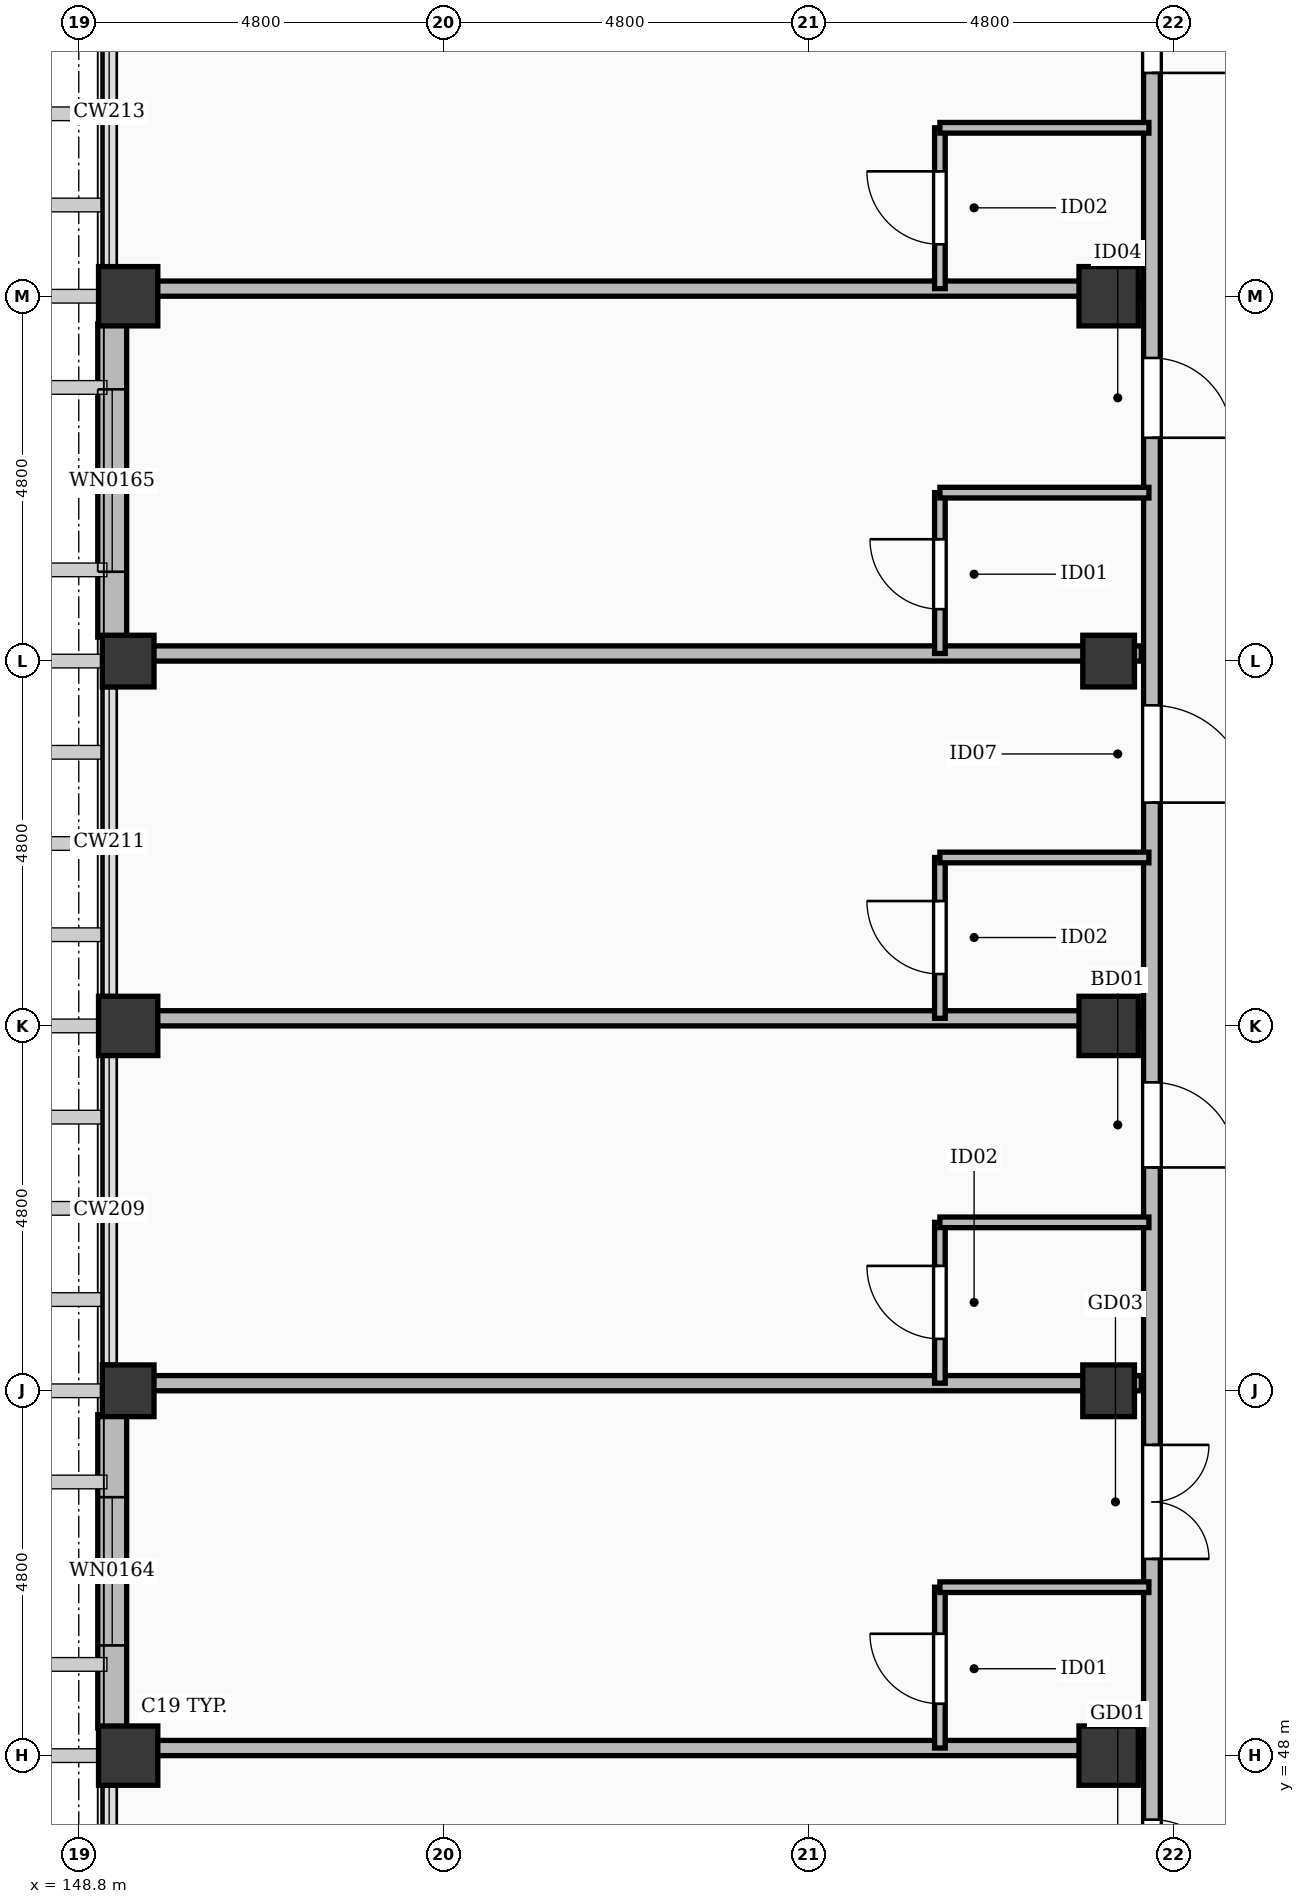
"""IFC4 building model, lengths in metres.
Left out: names, types, materials, properties, quantities, classifications, styles, units other than length and angle.
Written with IfcOpenShell. Run it as: python <this file> out.ifc"""

import sys

from ifc_helpers import new_model, si_unit, direction, frame, frame_2d, origin, origin_2d, place, context, subcontext, project, spatial, rectangle, extrude, element, fill, save


model = new_model("IFC4")
c1 = context("Model", 3, precision=1e-05, world=origin(), true_north=direction((0.0, 1.0)))
c2 = subcontext(c1, "Body", "Model", "MODEL_VIEW")
j1 = project(units=[si_unit("LENGTHUNIT", "METRE"), si_unit("PLANEANGLEUNIT", "RADIAN")], contexts=[c1])
p1 = place(None, origin())
s1 = spatial("IfcSite", under=j1, at=p1, CompositionType="ELEMENT")
p2 = place(p1, origin())
s2 = spatial("IfcBuilding", under=s1, at=p2, CompositionType="ELEMENT")
p3 = place(p2, frame((0.0, 0.0, 24.6)))
s3 = spatial("IfcBuildingStorey", under=s2, at=p3, CompositionType="ELEMENT", Elevation=24.6)
for number, where, z_axis, x_axis in (
    (1, (149.45, 48.0, 0.0), (0.0, 0.0, 1.0), (1.0, 0.0, 0.0)),
    (2, (149.45, 57.6, 0.0), (0.0, 0.0, 1.0), (1.0, 0.0, 0.0)),
    (3, (149.45, 67.2, 0.0), (0.0, 0.0, 1.0), (1.0, 0.0, 0.0)),
    (4, (162.35, 48.0, 0.0), (0.0, 0.0, 1.0), (1.0, 0.0, 0.0)),
    (5, (162.35, 57.6, 0.0), (0.0, 0.0, 1.0), (1.0, 0.0, 0.0)),
    (6, (162.35, 67.2, 0.0), (0.0, 0.0, 1.0), (1.0, 0.0, 0.0)),
):
    element("IfcColumn", number, at=place(p3, frame(where, z_axis=z_axis, x_axis=x_axis)), inside=s3, PredefinedType="COLUMN", context=c2, shape_type="SweptSolid", body=[
        extrude(rectangle(XDim=0.78, YDim=0.78, at=origin_2d()), origin(), (0.0, 0.0, 1.0), 3.6),
    ])
for number, where, z_axis, x_axis in (
    (7, (149.45, 52.8, 0.0), (0.0, 0.0, 1.0), (1.0, 0.0, 0.0)),
    (8, (149.45, 62.4, 0.0), (0.0, 0.0, 1.0), (1.0, 0.0, 0.0)),
    (9, (162.35, 52.8, 0.0), (0.0, 0.0, 1.0), (1.0, 0.0, 0.0)),
    (10, (162.35, 62.4, 0.0), (0.0, 0.0, 1.0), (1.0, 0.0, 0.0)),
):
    element("IfcColumn", number, at=place(p3, frame(where, z_axis=z_axis, x_axis=x_axis)), inside=s3, PredefinedType="COLUMN", context=c2, shape_type="SweptSolid", body=[
        extrude(rectangle(XDim=0.68, YDim=0.68, at=origin_2d()), origin(), (0.0, 0.0, 1.0), 3.6),
    ])
p4 = place(p3, frame((149.24, 48.365, 0.0), z_axis=(0.0, 0.0, 1.0), x_axis=(0.0, 1.0, 0.0)))
e11 = element("IfcWall", 11, at=p4, inside=s3, PredefinedType="SOLIDWALL", context=c2, shape_type="SweptSolid", body=[
    extrude(rectangle(XDim=4.12, YDim=0.38, at=frame_2d((2.06, 0.0))), origin(), (0.0, 0.0, 1.0), 2.632),
])
p5 = place(p4, frame((1.085, 0.0, 0.55)))
e12 = element("IfcOpeningElement", 12, at=p5, cuts=e11, PredefinedType="OPENING", context=c2, shape_type="SweptSolid", body=[
    extrude(rectangle(XDim=1.95, YDim=1.77, at=frame_2d((0.975, 0.885))), frame((0.0, 0.202, 0.0), z_axis=(0.0, -1.0, 0.0), x_axis=(1.0, 0.0, 0.0)), (0.0, 0.0, 1.0), 0.404),
])
p6 = place(p3, frame((149.24, 62.715, 0.0), z_axis=(0.0, 0.0, 1.0), x_axis=(0.0, 1.0, 0.0)))
e13 = element("IfcWall", 13, at=p6, inside=s3, PredefinedType="SOLIDWALL", context=c2, shape_type="SweptSolid", body=[
    extrude(rectangle(XDim=4.12, YDim=0.38, at=frame_2d((2.06, 0.0))), origin(), (0.0, 0.0, 1.0), 2.632),
])
p7 = place(p6, frame((0.86, 0.0, 0.55)))
e14 = element("IfcOpeningElement", 14, at=p7, cuts=e13, PredefinedType="OPENING", context=c2, shape_type="SweptSolid", body=[
    extrude(rectangle(XDim=2.4, YDim=1.8, at=frame_2d((1.2, 0.9))), frame((0.0, 0.202, 0.0), z_axis=(0.0, -1.0, 0.0), x_axis=(1.0, 0.0, 0.0)), (0.0, 0.0, 1.0), 0.404),
])
p8 = place(p3, frame((162.92, 29.15, 0.0), z_axis=(0.0, 0.0, 1.0), x_axis=(0.0, 1.0, 0.0)))
e15 = element("IfcWall", 15, at=p8, inside=s3, PredefinedType="PARTITIONING", context=c2, shape_type="SweptSolid", body=[
    extrude(rectangle(XDim=44.05, YDim=0.22, at=frame_2d((22.025, 0.0))), origin(), (0.0, 0.0, 1.0), 2.632),
])
p9 = place(p8, frame((5.15, 0.0, 0.0)))
e16 = element("IfcOpeningElement", 16, at=p9, cuts=e15, PredefinedType="OPENING", context=c2, shape_type="SweptSolid", body=[
    extrude(rectangle(XDim=0.98, YDim=2.15, at=frame_2d((0.49, 1.075))), frame((0.0, 0.122, 0.0), z_axis=(0.0, -1.0, 0.0), x_axis=(1.0, 0.0, 0.0)), (0.0, 0.0, 1.0), 0.244),
])
p10 = place(p8, frame((12.188, 0.0, 0.0)))
e17 = element("IfcOpeningElement", 17, at=p10, cuts=e15, PredefinedType="OPENING", context=c2, shape_type="SweptSolid", body=[
    extrude(rectangle(XDim=1.08, YDim=2.25, at=frame_2d((0.54, 1.125))), frame((0.0, 0.122, 0.0), z_axis=(0.0, -1.0, 0.0), x_axis=(1.0, 0.0, 0.0)), (0.0, 0.0, 1.0), 0.244),
])
p11 = place(p8, frame((16.988, 0.0, 0.0)))
e18 = element("IfcOpeningElement", 18, at=p11, cuts=e15, PredefinedType="OPENING", context=c2, shape_type="SweptSolid", body=[
    extrude(rectangle(XDim=1.02, YDim=2.2, at=frame_2d((0.51, 1.1))), frame((0.0, 0.122, 0.0), z_axis=(0.0, -1.0, 0.0), x_axis=(1.0, 0.0, 0.0)), (0.0, 0.0, 1.0), 0.244),
])
p12 = place(p8, frame((21.438, 0.0, 0.0)))
e19 = element("IfcOpeningElement", 19, at=p12, cuts=e15, PredefinedType="OPENING", context=c2, shape_type="SweptSolid", body=[
    extrude(rectangle(XDim=1.5, YDim=2.3, at=frame_2d((0.75, 1.15))), frame((0.0, 0.122, 0.0), z_axis=(0.0, -1.0, 0.0), x_axis=(1.0, 0.0, 0.0)), (0.0, 0.0, 1.0), 0.244),
])
p13 = place(p8, frame((26.588, 0.0, 0.0)))
e20 = element("IfcOpeningElement", 20, at=p13, cuts=e15, PredefinedType="OPENING", context=c2, shape_type="SweptSolid", body=[
    extrude(rectangle(XDim=1.12, YDim=2.15, at=frame_2d((0.56, 1.075))), frame((0.0, 0.122, 0.0), z_axis=(0.0, -1.0, 0.0), x_axis=(1.0, 0.0, 0.0)), (0.0, 0.0, 1.0), 0.244),
])
p14 = place(p8, frame((31.388, 0.0, 0.0)))
e21 = element("IfcOpeningElement", 21, at=p14, cuts=e15, PredefinedType="OPENING", context=c2, shape_type="SweptSolid", body=[
    extrude(rectangle(XDim=1.28, YDim=2.16, at=frame_2d((0.64, 1.08))), frame((0.0, 0.122, 0.0), z_axis=(0.0, -1.0, 0.0), x_axis=(1.0, 0.0, 0.0)), (0.0, 0.0, 1.0), 0.244),
])
p15 = place(p8, frame((36.188, 0.0, 0.0)))
e22 = element("IfcOpeningElement", 22, at=p15, cuts=e15, PredefinedType="OPENING", context=c2, shape_type="SweptSolid", body=[
    extrude(rectangle(XDim=1.05, YDim=2.18, at=frame_2d((0.525, 1.09))), frame((0.0, 0.122, 0.0), z_axis=(0.0, -1.0, 0.0), x_axis=(1.0, 0.0, 0.0)), (0.0, 0.0, 1.0), 0.244),
])
p16 = place(p8, frame((40.988, 0.0, 0.0)))
e23 = element("IfcOpeningElement", 23, at=p16, cuts=e15, PredefinedType="OPENING", context=c2, shape_type="SweptSolid", body=[
    extrude(rectangle(XDim=1.08, YDim=2.25, at=frame_2d((0.54, 1.125))), frame((0.0, 0.122, 0.0), z_axis=(0.0, -1.0, 0.0), x_axis=(1.0, 0.0, 0.0)), (0.0, 0.0, 1.0), 0.244),
])
p17 = place(p3, frame((149.55, 48.1, 0.0), z_axis=(0.0, 0.0, 1.0), x_axis=(1.0, 0.0, 0.0)))
e24 = element("IfcWall", 24, at=p17, inside=s3, PredefinedType="PARTITIONING", context=c2, shape_type="SweptSolid", body=[
    extrude(rectangle(XDim=13.23, YDim=0.2, at=frame_2d((6.615, 0.0))), origin(), (0.0, 0.0, 1.0), 2.632),
])
p18 = place(p3, frame((160.13, 48.1, 0.0), z_axis=(0.0, 0.0, 1.0), x_axis=(0.0, 1.0, 0.0)))
e25 = element("IfcWall", 25, at=p18, inside=s3, PredefinedType="PARTITIONING", context=c2, shape_type="SweptSolid", body=[
    extrude(rectangle(XDim=2.116, YDim=0.14, at=frame_2d((1.058, 0.0))), origin(), (0.0, 0.0, 1.0), 2.632),
])
p19 = place(p18, frame((0.583, 0.0, 0.0)))
e26 = element("IfcOpeningElement", 26, at=p19, cuts=e25, PredefinedType="OPENING", context=c2, shape_type="SweptSolid", body=[
    extrude(rectangle(XDim=0.92, YDim=2.1, at=frame_2d((0.46, 1.05))), frame((0.0, 0.082, 0.0), z_axis=(0.0, -1.0, 0.0), x_axis=(1.0, 0.0, 0.0)), (0.0, 0.0, 1.0), 0.164),
])
p20 = place(p3, frame((160.13, 50.216, 0.0), z_axis=(0.0, 0.0, 1.0), x_axis=(1.0, 0.0, 0.0)))
e27 = element("IfcWall", 27, at=p20, inside=s3, PredefinedType="PARTITIONING", context=c2, shape_type="SweptSolid", body=[
    extrude(rectangle(XDim=2.75, YDim=0.14, at=frame_2d((1.375, 0.0))), origin(), (0.0, 0.0, 1.0), 2.632),
])
p21 = place(p3, frame((149.55, 52.9, 0.0), z_axis=(0.0, 0.0, 1.0), x_axis=(1.0, 0.0, 0.0)))
e28 = element("IfcWall", 28, at=p21, inside=s3, PredefinedType="PARTITIONING", context=c2, shape_type="SweptSolid", body=[
    extrude(rectangle(XDim=13.23, YDim=0.2, at=frame_2d((6.615, 0.0))), origin(), (0.0, 0.0, 1.0), 2.632),
])
p22 = place(p3, frame((160.13, 52.9, 0.0), z_axis=(0.0, 0.0, 1.0), x_axis=(0.0, 1.0, 0.0)))
e29 = element("IfcWall", 29, at=p22, inside=s3, PredefinedType="PARTITIONING", context=c2, shape_type="SweptSolid", body=[
    extrude(rectangle(XDim=2.116, YDim=0.14, at=frame_2d((1.058, 0.0))), origin(), (0.0, 0.0, 1.0), 2.632),
])
p23 = place(p22, frame((0.583, 0.0, 0.0)))
e30 = element("IfcOpeningElement", 30, at=p23, cuts=e29, PredefinedType="OPENING", context=c2, shape_type="SweptSolid", body=[
    extrude(rectangle(XDim=0.96, YDim=2.12, at=frame_2d((0.48, 1.06))), frame((0.0, 0.082, 0.0), z_axis=(0.0, -1.0, 0.0), x_axis=(1.0, 0.0, 0.0)), (0.0, 0.0, 1.0), 0.164),
])
p24 = place(p3, frame((160.13, 55.016, 0.0), z_axis=(0.0, 0.0, 1.0), x_axis=(1.0, 0.0, 0.0)))
e31 = element("IfcWall", 31, at=p24, inside=s3, PredefinedType="PARTITIONING", context=c2, shape_type="SweptSolid", body=[
    extrude(rectangle(XDim=2.75, YDim=0.14, at=frame_2d((1.375, 0.0))), origin(), (0.0, 0.0, 1.0), 2.632),
])
p25 = place(p3, frame((149.55, 57.7, 0.0), z_axis=(0.0, 0.0, 1.0), x_axis=(1.0, 0.0, 0.0)))
e32 = element("IfcWall", 32, at=p25, inside=s3, PredefinedType="PARTITIONING", context=c2, shape_type="SweptSolid", body=[
    extrude(rectangle(XDim=13.23, YDim=0.2, at=frame_2d((6.615, 0.0))), origin(), (0.0, 0.0, 1.0), 2.632),
])
p26 = place(p3, frame((160.13, 57.7, 0.0), z_axis=(0.0, 0.0, 1.0), x_axis=(0.0, 1.0, 0.0)))
e33 = element("IfcWall", 33, at=p26, inside=s3, PredefinedType="PARTITIONING", context=c2, shape_type="SweptSolid", body=[
    extrude(rectangle(XDim=2.116, YDim=0.14, at=frame_2d((1.058, 0.0))), origin(), (0.0, 0.0, 1.0), 2.632),
])
p27 = place(p26, frame((0.583, 0.0, 0.0)))
e34 = element("IfcOpeningElement", 34, at=p27, cuts=e33, PredefinedType="OPENING", context=c2, shape_type="SweptSolid", body=[
    extrude(rectangle(XDim=0.96, YDim=2.12, at=frame_2d((0.48, 1.06))), frame((0.0, 0.082, 0.0), z_axis=(0.0, -1.0, 0.0), x_axis=(1.0, 0.0, 0.0)), (0.0, 0.0, 1.0), 0.164),
])
p28 = place(p3, frame((160.13, 59.816, 0.0), z_axis=(0.0, 0.0, 1.0), x_axis=(1.0, 0.0, 0.0)))
e35 = element("IfcWall", 35, at=p28, inside=s3, PredefinedType="PARTITIONING", context=c2, shape_type="SweptSolid", body=[
    extrude(rectangle(XDim=2.75, YDim=0.14, at=frame_2d((1.375, 0.0))), origin(), (0.0, 0.0, 1.0), 2.632),
])
p29 = place(p3, frame((149.55, 62.5, 0.0), z_axis=(0.0, 0.0, 1.0), x_axis=(1.0, 0.0, 0.0)))
e36 = element("IfcWall", 36, at=p29, inside=s3, PredefinedType="PARTITIONING", context=c2, shape_type="SweptSolid", body=[
    extrude(rectangle(XDim=13.23, YDim=0.2, at=frame_2d((6.615, 0.0))), origin(), (0.0, 0.0, 1.0), 2.632),
])
p30 = place(p3, frame((160.13, 62.5, 0.0), z_axis=(0.0, 0.0, 1.0), x_axis=(0.0, 1.0, 0.0)))
e37 = element("IfcWall", 37, at=p30, inside=s3, PredefinedType="PARTITIONING", context=c2, shape_type="SweptSolid", body=[
    extrude(rectangle(XDim=2.116, YDim=0.14, at=frame_2d((1.058, 0.0))), origin(), (0.0, 0.0, 1.0), 2.632),
])
p31 = place(p30, frame((0.583, 0.0, 0.0)))
e38 = element("IfcOpeningElement", 38, at=p31, cuts=e37, PredefinedType="OPENING", context=c2, shape_type="SweptSolid", body=[
    extrude(rectangle(XDim=0.92, YDim=2.1, at=frame_2d((0.46, 1.05))), frame((0.0, 0.082, 0.0), z_axis=(0.0, -1.0, 0.0), x_axis=(1.0, 0.0, 0.0)), (0.0, 0.0, 1.0), 0.164),
])
p32 = place(p3, frame((160.13, 64.616, 0.0), z_axis=(0.0, 0.0, 1.0), x_axis=(1.0, 0.0, 0.0)))
e39 = element("IfcWall", 39, at=p32, inside=s3, PredefinedType="PARTITIONING", context=c2, shape_type="SweptSolid", body=[
    extrude(rectangle(XDim=2.75, YDim=0.14, at=frame_2d((1.375, 0.0))), origin(), (0.0, 0.0, 1.0), 2.632),
])
p33 = place(p3, frame((149.55, 67.3, 0.0), z_axis=(0.0, 0.0, 1.0), x_axis=(1.0, 0.0, 0.0)))
e40 = element("IfcWall", 40, at=p33, inside=s3, PredefinedType="PARTITIONING", context=c2, shape_type="SweptSolid", body=[
    extrude(rectangle(XDim=13.23, YDim=0.2, at=frame_2d((6.615, 0.0))), origin(), (0.0, 0.0, 1.0), 2.632),
])
p34 = place(p3, frame((160.13, 67.3, 0.0), z_axis=(0.0, 0.0, 1.0), x_axis=(0.0, 1.0, 0.0)))
e41 = element("IfcWall", 41, at=p34, inside=s3, PredefinedType="PARTITIONING", context=c2, shape_type="SweptSolid", body=[
    extrude(rectangle(XDim=2.116, YDim=0.14, at=frame_2d((1.058, 0.0))), origin(), (0.0, 0.0, 1.0), 2.632),
])
p35 = place(p34, frame((0.583, 0.0, 0.0)))
e42 = element("IfcOpeningElement", 42, at=p35, cuts=e41, PredefinedType="OPENING", context=c2, shape_type="SweptSolid", body=[
    extrude(rectangle(XDim=0.96, YDim=2.12, at=frame_2d((0.48, 1.06))), frame((0.0, 0.082, 0.0), z_axis=(0.0, -1.0, 0.0), x_axis=(1.0, 0.0, 0.0)), (0.0, 0.0, 1.0), 0.164),
])
p36 = place(p3, frame((160.13, 69.416, 0.0), z_axis=(0.0, 0.0, 1.0), x_axis=(1.0, 0.0, 0.0)))
e43 = element("IfcWall", 43, at=p36, inside=s3, PredefinedType="PARTITIONING", context=c2, shape_type="SweptSolid", body=[
    extrude(rectangle(XDim=2.75, YDim=0.14, at=frame_2d((1.375, 0.0))), origin(), (0.0, 0.0, 1.0), 2.632),
])
p37 = place(p5, origin())
e44 = element("IfcWindow", 44, at=p37, inside=s3, PartitioningType="SINGLE_PANEL", PredefinedType="WINDOW", context=c2, shape_type="SweptSolid", body=[
    extrude(rectangle(XDim=1.95, YDim=1.77, at=frame_2d((0.975, 0.885))), frame((0.0, 0.03, 0.0), z_axis=(0.0, -1.0, 0.0), x_axis=(1.0, 0.0, 0.0)), (0.0, 0.0, 1.0), 0.06),
])
fill(e12, e44)
p38 = place(p7, origin())
e45 = element("IfcWindow", 45, at=p38, inside=s3, PartitioningType="SINGLE_PANEL", PredefinedType="WINDOW", context=c2, shape_type="SweptSolid", body=[
    extrude(rectangle(XDim=2.4, YDim=1.8, at=frame_2d((1.2, 0.9))), frame((0.0, 0.03, 0.0), z_axis=(0.0, -1.0, 0.0), x_axis=(1.0, 0.0, 0.0)), (0.0, 0.0, 1.0), 0.06),
])
fill(e14, e45)
p39 = place(p11, frame((1.02, 0.0, 0.0), z_axis=(0.0, 0.0, 1.0), x_axis=(-1.0, 0.0, 0.0)))
e46 = element("IfcDoor", 46, at=p39, inside=s3, OperationType="SINGLE_SWING_LEFT", PredefinedType="DOOR", context=c2, shape_type="SweptSolid", body=[
    extrude(rectangle(XDim=1.02, YDim=2.2, at=frame_2d((0.51, 1.1))), frame((0.0, 0.025, 0.0), z_axis=(0.0, -1.0, 0.0), x_axis=(1.0, 0.0, 0.0)), (0.0, 0.0, 1.0), 0.05),
])
fill(e18, e46)
p40 = place(p12, frame((1.5, 0.0, 0.0), z_axis=(0.0, 0.0, 1.0), x_axis=(-1.0, 0.0, 0.0)))
e47 = element("IfcDoor", 47, at=p40, inside=s3, OperationType="DOUBLE_DOOR_SINGLE_SWING", PredefinedType="DOOR", context=c2, shape_type="SweptSolid", body=[
    extrude(rectangle(XDim=1.5, YDim=2.3, at=frame_2d((0.75, 1.15))), frame((0.0, 0.025, 0.0), z_axis=(0.0, -1.0, 0.0), x_axis=(1.0, 0.0, 0.0)), (0.0, 0.0, 1.0), 0.05),
])
fill(e19, e47)
p41 = place(p19, origin())
e48 = element("IfcDoor", 48, at=p41, inside=s3, OperationType="SINGLE_SWING_RIGHT", PredefinedType="DOOR", context=c2, shape_type="SweptSolid", body=[
    extrude(rectangle(XDim=0.92, YDim=2.1, at=frame_2d((0.46, 1.05))), frame((0.0, 0.025, 0.0), z_axis=(0.0, -1.0, 0.0), x_axis=(1.0, 0.0, 0.0)), (0.0, 0.0, 1.0), 0.05),
])
fill(e26, e48)
p42 = place(p13, frame((1.12, 0.0, 0.0), z_axis=(0.0, 0.0, 1.0), x_axis=(-1.0, 0.0, 0.0)))
e49 = element("IfcDoor", 49, at=p42, inside=s3, OperationType="SINGLE_SWING_LEFT", PredefinedType="DOOR", context=c2, shape_type="SweptSolid", body=[
    extrude(rectangle(XDim=1.12, YDim=2.15, at=frame_2d((0.56, 1.075))), frame((0.0, 0.025, 0.0), z_axis=(0.0, -1.0, 0.0), x_axis=(1.0, 0.0, 0.0)), (0.0, 0.0, 1.0), 0.05),
])
fill(e20, e49)
p43 = place(p23, origin())
e50 = element("IfcDoor", 50, at=p43, inside=s3, OperationType="SINGLE_SWING_RIGHT", PredefinedType="DOOR", context=c2, shape_type="SweptSolid", body=[
    extrude(rectangle(XDim=0.96, YDim=2.12, at=frame_2d((0.48, 1.06))), frame((0.0, 0.025, 0.0), z_axis=(0.0, -1.0, 0.0), x_axis=(1.0, 0.0, 0.0)), (0.0, 0.0, 1.0), 0.05),
])
fill(e30, e50)
p44 = place(p14, frame((1.28, 0.0, 0.0), z_axis=(0.0, 0.0, 1.0), x_axis=(-1.0, 0.0, 0.0)))
e51 = element("IfcDoor", 51, at=p44, inside=s3, OperationType="SINGLE_SWING_LEFT", PredefinedType="DOOR", context=c2, shape_type="SweptSolid", body=[
    extrude(rectangle(XDim=1.28, YDim=2.16, at=frame_2d((0.64, 1.08))), frame((0.0, 0.025, 0.0), z_axis=(0.0, -1.0, 0.0), x_axis=(1.0, 0.0, 0.0)), (0.0, 0.0, 1.0), 0.05),
])
fill(e21, e51)
p45 = place(p27, origin())
e52 = element("IfcDoor", 52, at=p45, inside=s3, OperationType="SINGLE_SWING_RIGHT", PredefinedType="DOOR", context=c2, shape_type="SweptSolid", body=[
    extrude(rectangle(XDim=0.96, YDim=2.12, at=frame_2d((0.48, 1.06))), frame((0.0, 0.025, 0.0), z_axis=(0.0, -1.0, 0.0), x_axis=(1.0, 0.0, 0.0)), (0.0, 0.0, 1.0), 0.05),
])
fill(e34, e52)
p46 = place(p15, frame((1.05, 0.0, 0.0), z_axis=(0.0, 0.0, 1.0), x_axis=(-1.0, 0.0, 0.0)))
e53 = element("IfcDoor", 53, at=p46, inside=s3, OperationType="SINGLE_SWING_LEFT", PredefinedType="DOOR", context=c2, shape_type="SweptSolid", body=[
    extrude(rectangle(XDim=1.05, YDim=2.18, at=frame_2d((0.525, 1.09))), frame((0.0, 0.025, 0.0), z_axis=(0.0, -1.0, 0.0), x_axis=(1.0, 0.0, 0.0)), (0.0, 0.0, 1.0), 0.05),
])
fill(e22, e53)
p47 = place(p31, origin())
e54 = element("IfcDoor", 54, at=p47, inside=s3, OperationType="SINGLE_SWING_RIGHT", PredefinedType="DOOR", context=c2, shape_type="SweptSolid", body=[
    extrude(rectangle(XDim=0.92, YDim=2.1, at=frame_2d((0.46, 1.05))), frame((0.0, 0.025, 0.0), z_axis=(0.0, -1.0, 0.0), x_axis=(1.0, 0.0, 0.0)), (0.0, 0.0, 1.0), 0.05),
])
fill(e38, e54)
p48 = place(p16, frame((1.08, 0.0, 0.0), z_axis=(0.0, 0.0, 1.0), x_axis=(-1.0, 0.0, 0.0)))
e55 = element("IfcDoor", 55, at=p48, inside=s3, OperationType="SINGLE_SWING_LEFT", PredefinedType="DOOR", context=c2, shape_type="SweptSolid", body=[
    extrude(rectangle(XDim=1.08, YDim=2.25, at=frame_2d((0.54, 1.125))), frame((0.0, 0.025, 0.0), z_axis=(0.0, -1.0, 0.0), x_axis=(1.0, 0.0, 0.0)), (0.0, 0.0, 1.0), 0.05),
])
fill(e23, e55)
p49 = place(p35, origin())
e56 = element("IfcDoor", 56, at=p49, inside=s3, OperationType="SINGLE_SWING_RIGHT", PredefinedType="DOOR", context=c2, shape_type="SweptSolid", body=[
    extrude(rectangle(XDim=0.96, YDim=2.12, at=frame_2d((0.48, 1.06))), frame((0.0, 0.025, 0.0), z_axis=(0.0, -1.0, 0.0), x_axis=(1.0, 0.0, 0.0)), (0.0, 0.0, 1.0), 0.05),
])
fill(e42, e56)
save(model, sys.argv[1])
